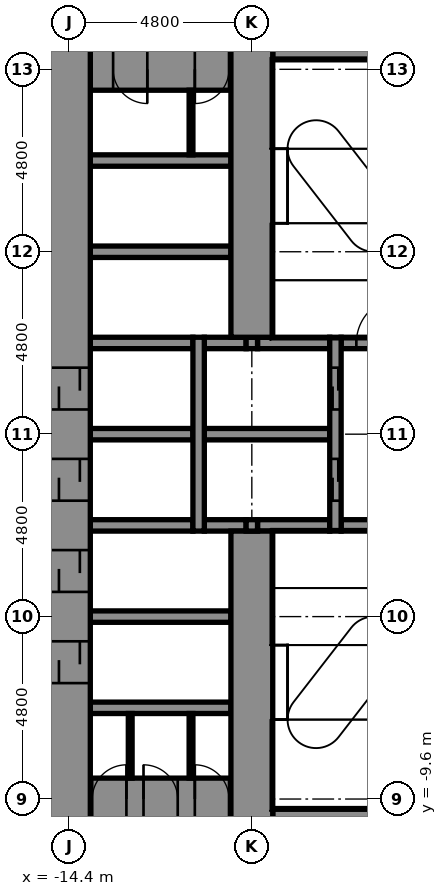
"""IFC4 building model, lengths in metres.
Left out: names, types, materials, properties, quantities, classifications, styles, units other than length and angle.
Written with IfcOpenShell. Run it as: python <this file> out.ifc"""

import sys

from ifc_helpers import new_model, si_unit, direction, frame, frame_2d, origin, place, context, subcontext, project, spatial, rectangle, extrude, element, fill, save


model = new_model("IFC4")
c1 = context("Model", 3, precision=1e-05, world=origin(), true_north=direction((0.0, 1.0)))
c2 = subcontext(c1, "Body", "Model", "MODEL_VIEW")
j1 = project(units=[si_unit("LENGTHUNIT", "METRE"), si_unit("PLANEANGLEUNIT", "RADIAN")], contexts=[c1])
p1 = place(None, origin())
s1 = spatial("IfcSite", under=j1, at=p1, CompositionType="ELEMENT")
p2 = place(p1, origin())
s2 = spatial("IfcBuilding", under=s1, at=p2, CompositionType="ELEMENT")
p3 = place(p2, frame((0.0, 0.0, 38.9)))
s3 = spatial("IfcBuildingStorey", under=s2, at=p3, CompositionType="ELEMENT", Elevation=38.9)
p4 = place(p3, frame((-9.05, -10.0, -0.25), z_axis=(0.0, 0.0, 1.0), x_axis=(1.0, 0.0, 0.0)))
e1 = element("IfcWall", 1, at=p4, inside=s3, PredefinedType="STANDARD", context=c2, shape_type="SweptSolid", body=[
    extrude(rectangle(XDim=3.8, YDim=0.3, at=frame_2d((1.9, 0.0))), origin(), (0.0, 0.0, 1.0), 5.5),
])
p5 = place(p3, frame((-13.85, -9.6, -0.25), z_axis=(0.0, 0.0, 1.0), x_axis=(1.0, 0.0, 0.0)))
e2 = element("IfcWall", 2, at=p5, inside=s3, PredefinedType="SHEAR", context=c2, shape_type="SweptSolid", body=[
    extrude(rectangle(XDim=3.7, YDim=1.1, at=frame_2d((1.85, 0.0))), origin(), (0.0, 0.0, 1.0), 5.5),
])
p6 = place(p5, frame((0.05, 0.0, 0.25)))
e3 = element("IfcOpeningElement", 3, at=p6, cuts=e2, PredefinedType="OPENING", context=c2, shape_type="SweptSolid", body=[
    extrude(rectangle(XDim=0.9, YDim=2.1, at=frame_2d((0.45, 1.05))), frame((0.0, 0.56, 0.0), z_axis=(0.0, -1.0, 0.0), x_axis=(1.0, 0.0, 0.0)), (0.0, 0.0, 1.0), 1.12),
])
p7 = place(p5, frame((1.4, 0.0, 0.25)))
e4 = element("IfcOpeningElement", 4, at=p7, cuts=e2, PredefinedType="OPENING", context=c2, shape_type="SweptSolid", body=[
    extrude(rectangle(XDim=0.9, YDim=2.1, at=frame_2d((0.45, 1.05))), frame((0.0, 0.56, 0.0), z_axis=(0.0, -1.0, 0.0), x_axis=(1.0, 0.0, 0.0)), (0.0, 0.0, 1.0), 1.12),
])
p8 = place(p5, frame((2.75, 0.0, 0.25)))
e5 = element("IfcOpeningElement", 5, at=p8, cuts=e2, PredefinedType="OPENING", context=c2, shape_type="SweptSolid", body=[
    extrude(rectangle(XDim=0.9, YDim=2.1, at=frame_2d((0.45, 1.05))), frame((0.0, 0.56, 0.0), z_axis=(0.0, -1.0, 0.0), x_axis=(1.0, 0.0, 0.0)), (0.0, 0.0, 1.0), 1.12),
])
for number, where, z_axis, x_axis in (
    (6, (-13.85, -7.2, -0.25), (0.0, 0.0, 1.0), (1.0, 0.0, 0.0)),
    (7, (-13.85, -4.8, -0.25), (0.0, 0.0, 1.0), (1.0, 0.0, 0.0)),
):
    element("IfcWall", number, at=place(p3, frame(where, z_axis=z_axis, x_axis=x_axis)), inside=s3, PredefinedType="STANDARD", context=c2, shape_type="SweptSolid", body=[
        extrude(rectangle(XDim=3.7, YDim=0.3, at=frame_2d((1.85, 0.0))), origin(), (0.0, 0.0, 1.0), 5.5),
    ])
p9 = place(p3, frame((-13.85, -2.4, -0.25), z_axis=(0.0, 0.0, 1.0), x_axis=(1.0, 0.0, 0.0)))
e8 = element("IfcWall", 8, at=p9, inside=s3, PredefinedType="STANDARD", context=c2, shape_type="SweptSolid", body=[
    extrude(rectangle(XDim=2.7, YDim=0.3, at=frame_2d((1.35, 0.0))), origin(), (0.0, 0.0, 1.0), 5.5),
])
p10 = place(p3, frame((-10.85, -2.4, -0.25), z_axis=(0.0, 0.0, 1.0), x_axis=(1.0, 0.0, 0.0)))
e9 = element("IfcWall", 9, at=p10, inside=s3, PredefinedType="STANDARD", context=c2, shape_type="SweptSolid", body=[
    extrude(rectangle(XDim=1.1, YDim=0.3, at=frame_2d((0.55, 0.0))), origin(), (0.0, 0.0, 1.0), 5.5),
])
p11 = place(p3, frame((-9.45, -2.4, -0.25), z_axis=(0.0, 0.0, 1.0), x_axis=(1.0, 0.0, 0.0)))
e10 = element("IfcWall", 10, at=p11, inside=s3, PredefinedType="STANDARD", context=c2, shape_type="SweptSolid", body=[
    extrude(rectangle(XDim=1.9, YDim=0.3, at=frame_2d((0.95, 0.0))), origin(), (0.0, 0.0, 1.0), 5.5),
])
p12 = place(p3, frame((-7.25, -2.4, -0.25), z_axis=(0.0, 0.0, 1.0), x_axis=(1.0, 0.0, 0.0)))
e11 = element("IfcWall", 11, at=p12, inside=s3, PredefinedType="STANDARD", context=c2, shape_type="SweptSolid", body=[
    extrude(rectangle(XDim=2.0, YDim=0.3, at=frame_2d((1.0, 0.0))), origin(), (0.0, 0.0, 1.0), 5.5),
])
p13 = place(p3, frame((-13.85, 0.0, -0.25), z_axis=(0.0, 0.0, 1.0), x_axis=(1.0, 0.0, 0.0)))
e12 = element("IfcWall", 12, at=p13, inside=s3, PredefinedType="STANDARD", context=c2, shape_type="SweptSolid", body=[
    extrude(rectangle(XDim=2.7, YDim=0.3, at=frame_2d((1.35, 0.0))), origin(), (0.0, 0.0, 1.0), 5.5),
])
p14 = place(p3, frame((-10.85, 0.0, -0.25), z_axis=(0.0, 0.0, 1.0), x_axis=(1.0, 0.0, 0.0)))
e13 = element("IfcWall", 13, at=p14, inside=s3, PredefinedType="STANDARD", context=c2, shape_type="SweptSolid", body=[
    extrude(rectangle(XDim=3.3, YDim=0.3, at=frame_2d((1.65, 0.0))), origin(), (0.0, 0.0, 1.0), 5.5),
])
p15 = place(p3, frame((-13.85, 2.4, -0.25), z_axis=(0.0, 0.0, 1.0), x_axis=(1.0, 0.0, 0.0)))
e14 = element("IfcWall", 14, at=p15, inside=s3, PredefinedType="STANDARD", context=c2, shape_type="SweptSolid", body=[
    extrude(rectangle(XDim=2.7, YDim=0.3, at=frame_2d((1.35, 0.0))), origin(), (0.0, 0.0, 1.0), 5.5),
])
p16 = place(p3, frame((-10.85, 2.4, -0.25), z_axis=(0.0, 0.0, 1.0), x_axis=(1.0, 0.0, 0.0)))
e15 = element("IfcWall", 15, at=p16, inside=s3, PredefinedType="STANDARD", context=c2, shape_type="SweptSolid", body=[
    extrude(rectangle(XDim=1.1, YDim=0.3, at=frame_2d((0.55, 0.0))), origin(), (0.0, 0.0, 1.0), 5.5),
])
p17 = place(p3, frame((-9.45, 2.4, -0.25), z_axis=(0.0, 0.0, 1.0), x_axis=(1.0, 0.0, 0.0)))
e16 = element("IfcWall", 16, at=p17, inside=s3, PredefinedType="STANDARD", context=c2, shape_type="SweptSolid", body=[
    extrude(rectangle(XDim=1.9, YDim=0.3, at=frame_2d((0.95, 0.0))), origin(), (0.0, 0.0, 1.0), 5.5),
])
p18 = place(p3, frame((-7.25, 2.4, -0.25), z_axis=(0.0, 0.0, 1.0), x_axis=(1.0, 0.0, 0.0)))
e17 = element("IfcWall", 17, at=p18, inside=s3, PredefinedType="STANDARD", context=c2, shape_type="SweptSolid", body=[
    extrude(rectangle(XDim=2.0, YDim=0.3, at=frame_2d((1.0, 0.0))), origin(), (0.0, 0.0, 1.0), 5.5),
])
p19 = place(p18, frame((0.4, 0.0, 0.25)))
e18 = element("IfcOpeningElement", 18, at=p19, cuts=e17, PredefinedType="OPENING", context=c2, shape_type="SweptSolid", body=[
    extrude(rectangle(XDim=1.2, YDim=2.1, at=frame_2d((0.6, 1.05))), frame((0.0, 0.16, 0.0), z_axis=(0.0, -1.0, 0.0), x_axis=(1.0, 0.0, 0.0)), (0.0, 0.0, 1.0), 0.32),
])
for number, where, z_axis, x_axis in (
    (19, (-13.85, 4.8, -0.25), (0.0, 0.0, 1.0), (1.0, 0.0, 0.0)),
    (20, (-13.85, 7.2, -0.25), (0.0, 0.0, 1.0), (1.0, 0.0, 0.0)),
):
    element("IfcWall", number, at=place(p3, frame(where, z_axis=z_axis, x_axis=x_axis)), inside=s3, PredefinedType="STANDARD", context=c2, shape_type="SweptSolid", body=[
        extrude(rectangle(XDim=3.7, YDim=0.3, at=frame_2d((1.85, 0.0))), origin(), (0.0, 0.0, 1.0), 5.5),
    ])
p20 = place(p3, frame((-13.85, 9.6, -0.25), z_axis=(0.0, 0.0, 1.0), x_axis=(1.0, 0.0, 0.0)))
e21 = element("IfcWall", 21, at=p20, inside=s3, PredefinedType="SHEAR", context=c2, shape_type="SweptSolid", body=[
    extrude(rectangle(XDim=3.7, YDim=1.1, at=frame_2d((1.85, 0.0))), origin(), (0.0, 0.0, 1.0), 5.5),
])
p21 = place(p20, frame((0.6, 0.0, 0.25)))
e22 = element("IfcOpeningElement", 22, at=p21, cuts=e21, PredefinedType="OPENING", context=c2, shape_type="SweptSolid", body=[
    extrude(rectangle(XDim=0.9, YDim=2.1, at=frame_2d((0.45, 1.05))), frame((0.0, 0.56, 0.0), z_axis=(0.0, -1.0, 0.0), x_axis=(1.0, 0.0, 0.0)), (0.0, 0.0, 1.0), 1.12),
])
p22 = place(p20, frame((2.75, 0.0, 0.25)))
e23 = element("IfcOpeningElement", 23, at=p22, cuts=e21, PredefinedType="OPENING", context=c2, shape_type="SweptSolid", body=[
    extrude(rectangle(XDim=0.9, YDim=2.1, at=frame_2d((0.45, 1.05))), frame((0.0, 0.56, 0.0), z_axis=(0.0, -1.0, 0.0), x_axis=(1.0, 0.0, 0.0)), (0.0, 0.0, 1.0), 1.12),
])
p23 = place(p3, frame((-9.05, 10.0, -0.25), z_axis=(0.0, 0.0, 1.0), x_axis=(1.0, 0.0, 0.0)))
e24 = element("IfcWall", 24, at=p23, inside=s3, PredefinedType="STANDARD", context=c2, shape_type="SweptSolid", body=[
    extrude(rectangle(XDim=3.8, YDim=0.3, at=frame_2d((1.9, 0.0))), origin(), (0.0, 0.0, 1.0), 5.5),
])
p24 = place(p3, frame((-14.4, -10.15, -0.25), z_axis=(0.0, 0.0, 1.0), x_axis=(0.0, 1.0, 0.0)))
e25 = element("IfcWall", 25, at=p24, inside=s3, PredefinedType="SHEAR", context=c2, shape_type="SweptSolid", body=[
    extrude(rectangle(XDim=20.3, YDim=1.1, at=frame_2d((10.15, 0.0))), origin(), (0.0, 0.0, 1.0), 5.5),
])
p25 = place(p24, frame((3.6, 0.0, 0.25)))
e26 = element("IfcOpeningElement", 26, at=p25, cuts=e25, PredefinedType="OPENING", context=c2, shape_type="SweptSolid", body=[
    extrude(rectangle(XDim=1.1, YDim=2.1, at=frame_2d((0.55, 1.05))), frame((0.0, 0.56, 0.0), z_axis=(0.0, -1.0, 0.0), x_axis=(1.0, 0.0, 0.0)), (0.0, 0.0, 1.0), 1.12),
])
p26 = place(p24, frame((6.0, 0.0, 0.25)))
e27 = element("IfcOpeningElement", 27, at=p26, cuts=e25, PredefinedType="OPENING", context=c2, shape_type="SweptSolid", body=[
    extrude(rectangle(XDim=1.1, YDim=2.1, at=frame_2d((0.55, 1.05))), frame((0.0, 0.56, 0.0), z_axis=(0.0, -1.0, 0.0), x_axis=(1.0, 0.0, 0.0)), (0.0, 0.0, 1.0), 1.12),
])
p27 = place(p24, frame((8.4, 0.0, 0.25)))
e28 = element("IfcOpeningElement", 28, at=p27, cuts=e25, PredefinedType="OPENING", context=c2, shape_type="SweptSolid", body=[
    extrude(rectangle(XDim=1.1, YDim=2.1, at=frame_2d((0.55, 1.05))), frame((0.0, 0.56, 0.0), z_axis=(0.0, -1.0, 0.0), x_axis=(1.0, 0.0, 0.0)), (0.0, 0.0, 1.0), 1.12),
])
p28 = place(p24, frame((10.8, 0.0, 0.25)))
e29 = element("IfcOpeningElement", 29, at=p28, cuts=e25, PredefinedType="OPENING", context=c2, shape_type="SweptSolid", body=[
    extrude(rectangle(XDim=1.1, YDim=2.1, at=frame_2d((0.55, 1.05))), frame((0.0, 0.56, 0.0), z_axis=(0.0, -1.0, 0.0), x_axis=(1.0, 0.0, 0.0)), (0.0, 0.0, 1.0), 1.12),
])
p29 = place(p3, frame((-11.0, -2.55, -0.25), z_axis=(0.0, 0.0, 1.0), x_axis=(0.0, 1.0, 0.0)))
e30 = element("IfcWall", 30, at=p29, inside=s3, PredefinedType="STANDARD", context=c2, shape_type="SweptSolid", body=[
    extrude(rectangle(XDim=5.1, YDim=0.3, at=frame_2d((2.55, 0.0))), origin(), (0.0, 0.0, 1.0), 5.5),
])
p30 = place(p3, frame((-9.6, -10.15, -0.25), z_axis=(0.0, 0.0, 1.0), x_axis=(0.0, 1.0, 0.0)))
e31 = element("IfcWall", 31, at=p30, inside=s3, PredefinedType="SHEAR", context=c2, shape_type="SweptSolid", body=[
    extrude(rectangle(XDim=7.6, YDim=1.1, at=frame_2d((3.8, 0.0))), origin(), (0.0, 0.0, 1.0), 5.5),
])
for number, where, z_axis, x_axis in (
    (32, (-9.6, -2.55, -0.25), (0.0, 0.0, 1.0), (0.0, 1.0, 0.0)),
    (33, (-9.6, 2.25, -0.25), (0.0, 0.0, 1.0), (0.0, 1.0, 0.0)),
):
    element("IfcWall", number, at=place(p3, frame(where, z_axis=z_axis, x_axis=x_axis)), inside=s3, PredefinedType="STANDARD", context=c2, shape_type="SweptSolid", body=[
        extrude(rectangle(XDim=0.3, YDim=0.3, at=frame_2d((0.15, 0.0))), origin(), (0.0, 0.0, 1.0), 5.5),
    ])
p31 = place(p3, frame((-9.6, 2.55, -0.25), z_axis=(0.0, 0.0, 1.0), x_axis=(0.0, 1.0, 0.0)))
e34 = element("IfcWall", 34, at=p31, inside=s3, PredefinedType="SHEAR", context=c2, shape_type="SweptSolid", body=[
    extrude(rectangle(XDim=7.6, YDim=1.1, at=frame_2d((3.8, 0.0))), origin(), (0.0, 0.0, 1.0), 5.5),
])
p32 = place(p3, frame((-7.4, -2.55, -0.25), z_axis=(0.0, 0.0, 1.0), x_axis=(0.0, 1.0, 0.0)))
e35 = element("IfcWall", 35, at=p32, inside=s3, PredefinedType="STANDARD", context=c2, shape_type="SweptSolid", body=[
    extrude(rectangle(XDim=5.1, YDim=0.3, at=frame_2d((2.55, 0.0))), origin(), (0.0, 0.0, 1.0), 5.5),
])
p33 = place(p32, frame((0.8, 0.0, 0.25)))
e36 = element("IfcOpeningElement", 36, at=p33, cuts=e35, PredefinedType="OPENING", context=c2, shape_type="SweptSolid", body=[
    extrude(rectangle(XDim=1.1, YDim=2.1, at=frame_2d((0.55, 1.05))), frame((0.0, 0.16, 0.0), z_axis=(0.0, -1.0, 0.0), x_axis=(1.0, 0.0, 0.0)), (0.0, 0.0, 1.0), 0.32),
])
p34 = place(p32, frame((3.2, 0.0, 0.25)))
e37 = element("IfcOpeningElement", 37, at=p34, cuts=e35, PredefinedType="OPENING", context=c2, shape_type="SweptSolid", body=[
    extrude(rectangle(XDim=1.1, YDim=2.1, at=frame_2d((0.55, 1.05))), frame((0.0, 0.16, 0.0), z_axis=(0.0, -1.0, 0.0), x_axis=(1.0, 0.0, 0.0)), (0.0, 0.0, 1.0), 0.32),
])
for number, where, z_axis, x_axis in (
    (38, (-11.2, -9.05, 0.0), (0.0, 0.0, 1.0), (0.0, 1.0, 0.0)),
    (39, (-11.2, 7.35, 0.0), (0.0, 0.0, 1.0), (0.0, 1.0, 0.0)),
    (40, (-12.8, -9.05, 0.0), (0.0, 0.0, 1.0), (0.0, 1.0, 0.0)),
):
    element("IfcWall", number, at=place(p3, frame(where, z_axis=z_axis, x_axis=x_axis)), inside=s3, PredefinedType="PARTITIONING", context=c2, shape_type="SweptSolid", body=[
        extrude(rectangle(XDim=1.7, YDim=0.1, at=frame_2d((0.85, 0.0))), origin(), (0.0, 0.0, 1.0), 5.25),
    ])
p35 = place(p33, origin())
e41 = element("IfcDoor", 41, at=p35, inside=s3, OperationType="DOUBLE_DOOR_SLIDING", PredefinedType="DOOR", context=c2, shape_type="SweptSolid", body=[
    extrude(rectangle(XDim=1.1, YDim=2.1, at=frame_2d((0.55, 1.05))), frame((0.0, 0.025, 0.0), z_axis=(0.0, -1.0, 0.0), x_axis=(1.0, 0.0, 0.0)), (0.0, 0.0, 1.0), 0.05),
])
fill(e36, e41)
p36 = place(p34, origin())
e42 = element("IfcDoor", 42, at=p36, inside=s3, OperationType="DOUBLE_DOOR_SLIDING", PredefinedType="DOOR", context=c2, shape_type="SweptSolid", body=[
    extrude(rectangle(XDim=1.1, YDim=2.1, at=frame_2d((0.55, 1.05))), frame((0.0, 0.025, 0.0), z_axis=(0.0, -1.0, 0.0), x_axis=(1.0, 0.0, 0.0)), (0.0, 0.0, 1.0), 0.05),
])
fill(e37, e42)
p37 = place(p25, origin())
e43 = element("IfcDoor", 43, at=p37, inside=s3, OperationType="DOUBLE_DOOR_SLIDING", PredefinedType="DOOR", context=c2, shape_type="SweptSolid", body=[
    extrude(rectangle(XDim=1.1, YDim=2.1, at=frame_2d((0.55, 1.05))), frame((0.0, 0.025, 0.0), z_axis=(0.0, -1.0, 0.0), x_axis=(1.0, 0.0, 0.0)), (0.0, 0.0, 1.0), 0.05),
])
fill(e26, e43)
p38 = place(p26, origin())
e44 = element("IfcDoor", 44, at=p38, inside=s3, OperationType="DOUBLE_DOOR_SLIDING", PredefinedType="DOOR", context=c2, shape_type="SweptSolid", body=[
    extrude(rectangle(XDim=1.1, YDim=2.1, at=frame_2d((0.55, 1.05))), frame((0.0, 0.025, 0.0), z_axis=(0.0, -1.0, 0.0), x_axis=(1.0, 0.0, 0.0)), (0.0, 0.0, 1.0), 0.05),
])
fill(e27, e44)
p39 = place(p27, origin())
e45 = element("IfcDoor", 45, at=p39, inside=s3, OperationType="DOUBLE_DOOR_SLIDING", PredefinedType="DOOR", context=c2, shape_type="SweptSolid", body=[
    extrude(rectangle(XDim=1.1, YDim=2.1, at=frame_2d((0.55, 1.05))), frame((0.0, 0.025, 0.0), z_axis=(0.0, -1.0, 0.0), x_axis=(1.0, 0.0, 0.0)), (0.0, 0.0, 1.0), 0.05),
])
fill(e28, e45)
p40 = place(p28, origin())
e46 = element("IfcDoor", 46, at=p40, inside=s3, OperationType="DOUBLE_DOOR_SLIDING", PredefinedType="DOOR", context=c2, shape_type="SweptSolid", body=[
    extrude(rectangle(XDim=1.1, YDim=2.1, at=frame_2d((0.55, 1.05))), frame((0.0, 0.025, 0.0), z_axis=(0.0, -1.0, 0.0), x_axis=(1.0, 0.0, 0.0)), (0.0, 0.0, 1.0), 0.05),
])
fill(e29, e46)
p41 = place(p6, origin())
e47 = element("IfcDoor", 47, at=p41, inside=s3, OperationType="SINGLE_SWING_RIGHT", PredefinedType="DOOR", context=c2, shape_type="SweptSolid", body=[
    extrude(rectangle(XDim=0.9, YDim=2.1, at=frame_2d((0.45, 1.05))), frame((0.0, 0.025, 0.0), z_axis=(0.0, -1.0, 0.0), x_axis=(1.0, 0.0, 0.0)), (0.0, 0.0, 1.0), 0.05),
])
fill(e3, e47)
p42 = place(p7, origin())
e48 = element("IfcDoor", 48, at=p42, inside=s3, OperationType="SINGLE_SWING_LEFT", PredefinedType="DOOR", context=c2, shape_type="SweptSolid", body=[
    extrude(rectangle(XDim=0.9, YDim=2.1, at=frame_2d((0.45, 1.05))), frame((0.0, 0.025, 0.0), z_axis=(0.0, -1.0, 0.0), x_axis=(1.0, 0.0, 0.0)), (0.0, 0.0, 1.0), 0.05),
])
fill(e4, e48)
p43 = place(p8, origin())
e49 = element("IfcDoor", 49, at=p43, inside=s3, OperationType="SINGLE_SWING_LEFT", PredefinedType="DOOR", context=c2, shape_type="SweptSolid", body=[
    extrude(rectangle(XDim=0.9, YDim=2.1, at=frame_2d((0.45, 1.05))), frame((0.0, 0.025, 0.0), z_axis=(0.0, -1.0, 0.0), x_axis=(1.0, 0.0, 0.0)), (0.0, 0.0, 1.0), 0.05),
])
fill(e5, e49)
p44 = place(p21, frame((0.9, 0.0, 0.0), z_axis=(0.0, 0.0, 1.0), x_axis=(-1.0, 0.0, 0.0)))
e50 = element("IfcDoor", 50, at=p44, inside=s3, OperationType="SINGLE_SWING_RIGHT", PredefinedType="DOOR", context=c2, shape_type="SweptSolid", body=[
    extrude(rectangle(XDim=0.9, YDim=2.1, at=frame_2d((0.45, 1.05))), frame((0.0, 0.025, 0.0), z_axis=(0.0, -1.0, 0.0), x_axis=(1.0, 0.0, 0.0)), (0.0, 0.0, 1.0), 0.05),
])
fill(e22, e50)
p45 = place(p22, frame((0.9, 0.0, 0.0), z_axis=(0.0, 0.0, 1.0), x_axis=(-1.0, 0.0, 0.0)))
e51 = element("IfcDoor", 51, at=p45, inside=s3, OperationType="SINGLE_SWING_LEFT", PredefinedType="DOOR", context=c2, shape_type="SweptSolid", body=[
    extrude(rectangle(XDim=0.9, YDim=2.1, at=frame_2d((0.45, 1.05))), frame((0.0, 0.025, 0.0), z_axis=(0.0, -1.0, 0.0), x_axis=(1.0, 0.0, 0.0)), (0.0, 0.0, 1.0), 0.05),
])
fill(e23, e51)
p46 = place(p19, origin())
e52 = element("IfcDoor", 52, at=p46, inside=s3, OperationType="SINGLE_SWING_RIGHT", PredefinedType="DOOR", context=c2, shape_type="SweptSolid", body=[
    extrude(rectangle(XDim=1.2, YDim=2.1, at=frame_2d((0.6, 1.05))), frame((0.0, 0.025, 0.0), z_axis=(0.0, -1.0, 0.0), x_axis=(1.0, 0.0, 0.0)), (0.0, 0.0, 1.0), 0.05),
])
fill(e18, e52)
save(model, sys.argv[1])
